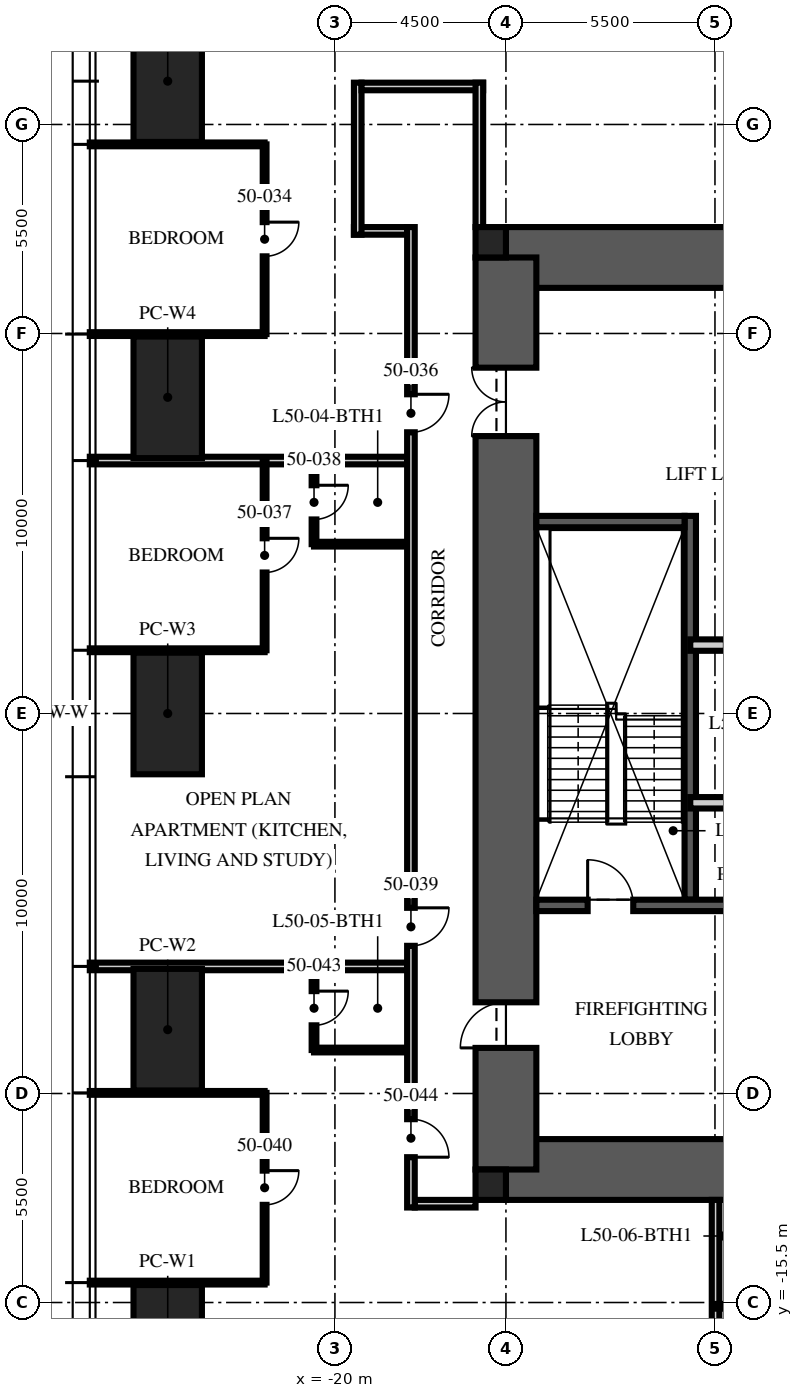
"""IFC4 building model, lengths in metres.
Left out: names, types, materials, properties, quantities, classifications, styles, units other than length and angle.
Written with IfcOpenShell. Run it as: python <this file> out.ifc"""

import sys

from ifc_helpers import new_model, si_unit, direction, frame, frame_2d, origin, origin_2d, place, context, subcontext, project, spatial, rectangle, hollow_rectangle, extrude, element, fill, save


model = new_model("IFC4")
c1 = context("Model", 3, precision=1e-05, world=origin(), true_north=direction((0.0, 1.0)))
c2 = subcontext(c1, "Body", "Model", "MODEL_VIEW")
j1 = project(units=[si_unit("LENGTHUNIT", "METRE"), si_unit("PLANEANGLEUNIT", "RADIAN")], contexts=[c1])
p1 = place(None, origin())
s1 = spatial("IfcSite", under=j1, at=p1, CompositionType="ELEMENT")
p2 = place(p1, origin())
s2 = spatial("IfcBuilding", under=s1, at=p2, CompositionType="ELEMENT")
p3 = place(p2, frame((0.0, 0.0, 203.25)))
s3 = spatial("IfcBuildingStorey", under=s2, at=p3, CompositionType="ELEMENT", Elevation=203.25)
for number, where, z_axis, x_axis in (
    (1, (-15.5, 12.0, -0.25), (0.0, 0.0, 1.0), (1.0, 0.0, 0.0)),
    (2, (-15.5, -12.0, -0.25), (0.0, 0.0, 1.0), (1.0, 0.0, 0.0)),
):
    element("IfcWall", number, at=place(p3, frame(where, z_axis=z_axis, x_axis=x_axis)), inside=s3, PredefinedType="SHEAR", context=c2, shape_type="SweptSolid", body=[
        extrude(rectangle(XDim=31.0, YDim=1.6, at=frame_2d((15.5, 0.0))), origin(), (0.0, 0.0, 1.0), 3.75),
    ])
p4 = place(p3, frame((-15.5, -12.0, -0.25), z_axis=(0.0, 0.0, 1.0), x_axis=(0.0, 1.0, 0.0)))
e3 = element("IfcWall", 3, at=p4, inside=s3, PredefinedType="SHEAR", context=c2, shape_type="SweptSolid", body=[
    extrude(rectangle(XDim=24.0, YDim=1.6, at=frame_2d((12.0, 0.0))), origin(), (0.0, 0.0, 1.0), 3.75),
])
p5 = place(p4, frame((3.2, 0.0, 0.25)))
e4 = element("IfcOpeningElement", 4, at=p5, cuts=e3, PredefinedType="OPENING", context=c2, shape_type="SweptSolid", body=[
    extrude(rectangle(XDim=1.2, YDim=2.1, at=frame_2d((0.6, 1.05))), frame((0.0, 0.81, 0.0), z_axis=(0.0, -1.0, 0.0), x_axis=(1.0, 0.0, 0.0)), (0.0, 0.0, 1.0), 1.62),
])
p6 = place(p4, frame((19.3, 0.0, 0.25)))
e5 = element("IfcOpeningElement", 5, at=p6, cuts=e3, PredefinedType="OPENING", context=c2, shape_type="SweptSolid", body=[
    extrude(rectangle(XDim=1.8, YDim=2.1, at=frame_2d((0.9, 1.05))), frame((0.0, 0.81, 0.0), z_axis=(0.0, -1.0, 0.0), x_axis=(1.0, 0.0, 0.0)), (0.0, 0.0, 1.0), 1.62),
])
for number, where, z_axis, x_axis in (
    (6, (-15.9, 12.4, -0.25), (0.0, 0.0, 1.0), (1.0, 0.0, 0.0)),
    (7, (-15.9, -12.4, -0.25), (0.0, 0.0, 1.0), (1.0, 0.0, 0.0)),
):
    element("IfcColumn", number, at=place(p3, frame(where, z_axis=z_axis, x_axis=x_axis)), inside=s3, PredefinedType="COLUMN", context=c2, shape_type="SweptSolid", body=[
        extrude(rectangle(XDim=0.8, YDim=0.8, at=origin_2d()), origin(), (0.0, 0.0, 1.0), 3.75),
    ])
for number, where, z_axis, x_axis in (
    (8, (-24.4, -16.64, 0.0), (0.0, 0.0, 1.0), (0.0, 1.0, 0.0)),
    (9, (-24.4, -8.32, 0.0), (0.0, 0.0, 1.0), (0.0, 1.0, 0.0)),
    (10, (-24.4, 0.0, 0.0), (0.0, 0.0, 1.0), (0.0, 1.0, 0.0)),
    (11, (-24.4, 8.32, 0.0), (0.0, 0.0, 1.0), (0.0, 1.0, 0.0)),
    (12, (-24.4, 16.64, 0.0), (0.0, 0.0, 1.0), (0.0, 1.0, 0.0)),
):
    element("IfcColumn", number, at=place(p3, frame(where, z_axis=z_axis, x_axis=x_axis)), inside=s3, PredefinedType="COLUMN", context=c2, shape_type="SweptSolid", body=[
        extrude(hollow_rectangle(XDim=3.2, YDim=1.8, WallThickness=0.2, at=origin_2d()), origin(), (0.0, 0.0, 1.0), 3.75),
    ])
p7 = place(p3, frame((-10.65, -4.9, 0.0), z_axis=(0.0, 0.0, 1.0), x_axis=(0.0, 1.0, 0.0)))
e13 = element("IfcWall", 13, at=p7, inside=s3, PredefinedType="SOLIDWALL", context=c2, shape_type="SweptSolid", body=[
    extrude(rectangle(XDim=10.1, YDim=0.3, at=frame_2d((5.05, 0.0))), origin(), (0.0, 0.0, 1.0), 3.5),
])
p8 = place(p3, frame((-14.7, -5.05, 0.0), z_axis=(0.0, 0.0, 1.0), x_axis=(1.0, 0.0, 0.0)))
e14 = element("IfcWall", 14, at=p8, inside=s3, PredefinedType="SOLIDWALL", context=c2, shape_type="SweptSolid", body=[
    extrude(rectangle(XDim=5.9, YDim=0.3, at=frame_2d((2.95, 0.0))), origin(), (0.0, 0.0, 1.0), 3.5),
])
p9 = place(p8, frame((1.35, 0.0, 0.0)))
e15 = element("IfcOpeningElement", 15, at=p9, cuts=e14, PredefinedType="OPENING", context=c2, shape_type="SweptSolid", body=[
    extrude(rectangle(XDim=1.2, YDim=2.1, at=frame_2d((0.6, 1.05))), frame((0.0, 0.16, 0.0), z_axis=(0.0, -1.0, 0.0), x_axis=(1.0, 0.0, 0.0)), (0.0, 0.0, 1.0), 0.32),
])
p10 = place(p3, frame((-14.7, 5.05, 0.0), z_axis=(0.0, 0.0, 1.0), x_axis=(1.0, 0.0, 0.0)))
e16 = element("IfcWall", 16, at=p10, inside=s3, PredefinedType="SOLIDWALL", context=c2, shape_type="SweptSolid", body=[
    extrude(rectangle(XDim=3.9, YDim=0.3, at=frame_2d((1.95, 0.0))), origin(), (0.0, 0.0, 1.0), 3.5),
])
p11 = place(p3, frame((-10.65, 1.8, 0.0), z_axis=(0.0, 0.0, 1.0), x_axis=(1.0, 0.0, 0.0)))
e17 = element("IfcWall", 17, at=p11, inside=s3, PredefinedType="PARTITIONING", context=c2, shape_type="SweptSolid", body=[
    extrude(rectangle(XDim=21.3, YDim=0.3, at=frame_2d((10.65, 0.0))), origin(), (0.0, 0.0, 1.0), 3.5),
])
p12 = place(p11, frame((10.05, 0.0, 0.0)))
e18 = element("IfcOpeningElement", 18, at=p12, cuts=e17, PredefinedType="OPENING", context=c2, shape_type="SweptSolid", body=[
    extrude(rectangle(XDim=1.2, YDim=2.1, at=frame_2d((0.6, 1.05))), frame((0.0, 0.16, 0.0), z_axis=(0.0, -1.0, 0.0), x_axis=(1.0, 0.0, 0.0)), (0.0, 0.0, 1.0), 0.32),
])
p13 = place(p11, frame((0.938, 0.0, 0.0)))
e19 = element("IfcOpeningElement", 19, at=p13, cuts=e17, PredefinedType="OPENING", context=c2, shape_type="SweptSolid", body=[
    extrude(rectangle(XDim=0.9, YDim=2.1, at=frame_2d((0.45, 1.05))), frame((0.0, 0.16, 0.0), z_axis=(0.0, -1.0, 0.0), x_axis=(1.0, 0.0, 0.0)), (0.0, 0.0, 1.0), 0.32),
])
p14 = place(p3, frame((-10.65, -2.35, 0.0), z_axis=(0.0, 0.0, 1.0), x_axis=(1.0, 0.0, 0.0)))
e20 = element("IfcWall", 20, at=p14, inside=s3, PredefinedType="PARTITIONING", context=c2, shape_type="SweptSolid", body=[
    extrude(rectangle(XDim=5.55, YDim=0.3, at=frame_2d((2.775, 0.0))), origin(), (0.0, 0.0, 1.0), 3.5),
])
p15 = place(p3, frame((-18.1, 12.7, 0.0), z_axis=(0.0, 0.0, 1.0), x_axis=(-1.0, 0.0, 0.0)))
e21 = element("IfcWall", 21, at=p15, inside=s3, PredefinedType="PARTITIONING", context=c2, shape_type="SweptSolid", body=[
    extrude(rectangle(XDim=1.4, YDim=0.2, at=frame_2d((0.7, 0.0))), origin(), (0.0, 0.0, 1.0), 2.81),
])
p16 = place(p3, frame((-19.4, 12.6, 0.0), z_axis=(0.0, 0.0, 1.0), x_axis=(0.0, 1.0, 0.0)))
e22 = element("IfcWall", 22, at=p16, inside=s3, PredefinedType="PARTITIONING", context=c2, shape_type="SweptSolid", body=[
    extrude(rectangle(XDim=4.0, YDim=0.2, at=frame_2d((2.0, 0.0))), origin(), (0.0, 0.0, 1.0), 2.6),
])
p17 = place(p3, frame((-19.3, 16.5, 0.0), z_axis=(0.0, 0.0, 1.0), x_axis=(1.0, 0.0, 0.0)))
e23 = element("IfcWall", 23, at=p17, inside=s3, PredefinedType="PARTITIONING", context=c2, shape_type="SweptSolid", body=[
    extrude(rectangle(XDim=3.2, YDim=0.2, at=frame_2d((1.6, 0.0))), origin(), (0.0, 0.0, 1.0), 2.3),
])
p18 = place(p3, frame((-16.2, 16.6, 0.0), z_axis=(0.0, 0.0, 1.0), x_axis=(0.0, -1.0, 0.0)))
e24 = element("IfcWall", 24, at=p18, inside=s3, PredefinedType="PARTITIONING", context=c2, shape_type="SweptSolid", body=[
    extrude(rectangle(XDim=3.8, YDim=0.2, at=frame_2d((1.9, 0.0))), origin(), (0.0, 0.0, 1.0), 2.3),
])
p19 = place(p3, frame((-16.3, -12.9, 0.0), z_axis=(0.0, 0.0, 1.0), x_axis=(-1.0, 0.0, 0.0)))
e25 = element("IfcWall", 25, at=p19, inside=s3, PredefinedType="PARTITIONING", context=c2, shape_type="SweptSolid", body=[
    extrude(rectangle(XDim=1.6, YDim=0.2, at=frame_2d((0.8, 0.0))), origin(), (0.0, 0.0, 1.0), 2.3),
])
for number, where, z_axis, x_axis in (
    (26, (-21.85, 14.976, 0.0), (0.0, 0.0, 1.0), (-1.0, 0.0, 0.0)),
    (27, (-21.85, 9.984, 0.0), (0.0, 0.0, 1.0), (-1.0, 0.0, 0.0)),
):
    element("IfcWall", number, at=place(p3, frame(where, z_axis=z_axis, x_axis=x_axis)), inside=s3, PredefinedType="PARTITIONING", context=c2, shape_type="SweptSolid", body=[
        extrude(rectangle(XDim=4.6, YDim=0.1, at=frame_2d((2.3, 0.0))), origin(), (0.0, 0.0, 1.0), 2.91),
    ])
p20 = place(p3, frame((-18.1, 6.656, 0.0), z_axis=(0.0, 0.0, 1.0), x_axis=(-1.0, 0.0, 0.0)))
e28 = element("IfcWall", 28, at=p20, inside=s3, PredefinedType="PARTITIONING", context=c2, shape_type="SweptSolid", body=[
    extrude(rectangle(XDim=8.35, YDim=0.2, at=frame_2d((4.175, 0.0))), origin(), (0.0, 0.0, 1.0), 2.91),
])
p21 = place(p3, frame((-21.85, 1.664, 0.0), z_axis=(0.0, 0.0, 1.0), x_axis=(-1.0, 0.0, 0.0)))
e29 = element("IfcWall", 29, at=p21, inside=s3, PredefinedType="PARTITIONING", context=c2, shape_type="SweptSolid", body=[
    extrude(rectangle(XDim=4.6, YDim=0.1, at=frame_2d((2.3, 0.0))), origin(), (0.0, 0.0, 1.0), 2.91),
])
p22 = place(p3, frame((-18.1, -6.656, 0.0), z_axis=(0.0, 0.0, 1.0), x_axis=(-1.0, 0.0, 0.0)))
e30 = element("IfcWall", 30, at=p22, inside=s3, PredefinedType="PARTITIONING", context=c2, shape_type="SweptSolid", body=[
    extrude(rectangle(XDim=8.35, YDim=0.2, at=frame_2d((4.175, 0.0))), origin(), (0.0, 0.0, 1.0), 2.91),
])
for number, where, z_axis, x_axis in (
    (31, (-21.85, -9.984, 0.0), (0.0, 0.0, 1.0), (-1.0, 0.0, 0.0)),
    (32, (-21.85, -14.976, 0.0), (0.0, 0.0, 1.0), (-1.0, 0.0, 0.0)),
):
    element("IfcWall", number, at=place(p3, frame(where, z_axis=z_axis, x_axis=x_axis)), inside=s3, PredefinedType="PARTITIONING", context=c2, shape_type="SweptSolid", body=[
        extrude(rectangle(XDim=4.6, YDim=0.1, at=frame_2d((2.3, 0.0))), origin(), (0.0, 0.0, 1.0), 2.91),
    ])
p23 = place(p3, frame((-9.984, -12.8, 0.0), z_axis=(0.0, 0.0, 1.0), x_axis=(0.0, -1.0, 0.0)))
e33 = element("IfcWall", 33, at=p23, inside=s3, PredefinedType="PARTITIONING", context=c2, shape_type="SweptSolid", body=[
    extrude(rectangle(XDim=13.65, YDim=0.2, at=frame_2d((6.825, 0.0))), origin(), (0.0, 0.0, 1.0), 2.91),
])
p24 = place(p3, frame((-21.85, 14.976, 0.0), z_axis=(0.0, 0.0, 1.0), x_axis=(0.0, -1.0, 0.0)))
e34 = element("IfcWall", 34, at=p24, inside=s3, PredefinedType="PARTITIONING", context=c2, shape_type="SweptSolid", body=[
    extrude(rectangle(XDim=4.992, YDim=0.1, at=frame_2d((2.496, 0.0))), origin(), (0.0, 0.0, 1.0), 2.81),
])
p25 = place(p24, frame((2.046, 0.0, 0.0)))
e35 = element("IfcOpeningElement", 35, at=p25, cuts=e34, PredefinedType="OPENING", context=c2, shape_type="SweptSolid", body=[
    extrude(rectangle(XDim=0.9, YDim=2.1, at=frame_2d((0.45, 1.05))), frame((0.0, 0.06, 0.0), z_axis=(0.0, -1.0, 0.0), x_axis=(1.0, 0.0, 0.0)), (0.0, 0.0, 1.0), 0.12),
])
p26 = place(p3, frame((-21.85, 6.656, 0.0), z_axis=(0.0, 0.0, 1.0), x_axis=(0.0, -1.0, 0.0)))
e36 = element("IfcWall", 36, at=p26, inside=s3, PredefinedType="PARTITIONING", context=c2, shape_type="SweptSolid", body=[
    extrude(rectangle(XDim=4.992, YDim=0.1, at=frame_2d((2.496, 0.0))), origin(), (0.0, 0.0, 1.0), 2.81),
])
p27 = place(p26, frame((2.046, 0.0, 0.0)))
e37 = element("IfcOpeningElement", 37, at=p27, cuts=e36, PredefinedType="OPENING", context=c2, shape_type="SweptSolid", body=[
    extrude(rectangle(XDim=0.9, YDim=2.1, at=frame_2d((0.45, 1.05))), frame((0.0, 0.06, 0.0), z_axis=(0.0, -1.0, 0.0), x_axis=(1.0, 0.0, 0.0)), (0.0, 0.0, 1.0), 0.12),
])
p28 = place(p3, frame((-20.55, 6.656, 0.0), z_axis=(0.0, 0.0, 1.0), x_axis=(0.0, -1.0, 0.0)))
e38 = element("IfcWall", 38, at=p28, inside=s3, PredefinedType="PARTITIONING", context=c2, shape_type="SweptSolid", body=[
    extrude(rectangle(XDim=2.2, YDim=0.125, at=frame_2d((1.1, 0.0))), origin(), (0.0, 0.0, 1.0), 3.5),
])
p29 = place(p28, frame((0.65, 0.0, 0.0)))
e39 = element("IfcOpeningElement", 39, at=p29, cuts=e38, PredefinedType="OPENING", context=c2, shape_type="SweptSolid", body=[
    extrude(rectangle(XDim=0.9, YDim=2.1, at=frame_2d((0.45, 1.05))), frame((0.0, 0.073, 0.0), z_axis=(0.0, -1.0, 0.0), x_axis=(1.0, 0.0, 0.0)), (0.0, 0.0, 1.0), 0.145),
])
p30 = place(p3, frame((-18.1, 4.456, 0.0), z_axis=(0.0, 0.0, 1.0), x_axis=(-1.0, 0.0, 0.0)))
e40 = element("IfcWall", 40, at=p30, inside=s3, PredefinedType="PARTITIONING", context=c2, shape_type="SweptSolid", body=[
    extrude(rectangle(XDim=2.45, YDim=0.125, at=frame_2d((1.225, 0.0))), origin(), (0.0, 0.0, 1.0), 3.5),
])
p31 = place(p3, frame((-21.85, -9.984, 0.0), z_axis=(0.0, 0.0, 1.0), x_axis=(0.0, -1.0, 0.0)))
e41 = element("IfcWall", 41, at=p31, inside=s3, PredefinedType="PARTITIONING", context=c2, shape_type="SweptSolid", body=[
    extrude(rectangle(XDim=4.992, YDim=0.1, at=frame_2d((2.496, 0.0))), origin(), (0.0, 0.0, 1.0), 2.81),
])
p32 = place(p31, frame((2.046, 0.0, 0.0)))
e42 = element("IfcOpeningElement", 42, at=p32, cuts=e41, PredefinedType="OPENING", context=c2, shape_type="SweptSolid", body=[
    extrude(rectangle(XDim=0.9, YDim=2.1, at=frame_2d((0.45, 1.05))), frame((0.0, 0.06, 0.0), z_axis=(0.0, -1.0, 0.0), x_axis=(1.0, 0.0, 0.0)), (0.0, 0.0, 1.0), 0.12),
])
p33 = place(p3, frame((-20.55, -6.656, 0.0), z_axis=(0.0, 0.0, 1.0), x_axis=(0.0, -1.0, 0.0)))
e43 = element("IfcWall", 43, at=p33, inside=s3, PredefinedType="PARTITIONING", context=c2, shape_type="SweptSolid", body=[
    extrude(rectangle(XDim=2.2, YDim=0.125, at=frame_2d((1.1, 0.0))), origin(), (0.0, 0.0, 1.0), 2.6),
])
p34 = place(p33, frame((0.65, 0.0, 0.0)))
e44 = element("IfcOpeningElement", 44, at=p34, cuts=e43, PredefinedType="OPENING", context=c2, shape_type="SweptSolid", body=[
    extrude(rectangle(XDim=0.9, YDim=2.1, at=frame_2d((0.45, 1.05))), frame((0.0, 0.073, 0.0), z_axis=(0.0, -1.0, 0.0), x_axis=(1.0, 0.0, 0.0)), (0.0, 0.0, 1.0), 0.145),
])
p35 = place(p3, frame((-18.1, -8.856, 0.0), z_axis=(0.0, 0.0, 1.0), x_axis=(-1.0, 0.0, 0.0)))
e45 = element("IfcWall", 45, at=p35, inside=s3, PredefinedType="PARTITIONING", context=c2, shape_type="SweptSolid", body=[
    extrude(rectangle(XDim=2.45, YDim=0.125, at=frame_2d((1.225, 0.0))), origin(), (0.0, 0.0, 1.0), 3.5),
])
p36 = place(p3, frame((-9.984, -15.6, 0.0), z_axis=(0.0, 0.0, 1.0), x_axis=(1.0, 0.0, 0.0)))
e46 = element("IfcWall", 46, at=p36, inside=s3, PredefinedType="PARTITIONING", context=c2, shape_type="SweptSolid", body=[
    extrude(rectangle(XDim=4.0, YDim=0.125, at=frame_2d((2.0, 0.0))), origin(), (0.0, 0.0, 1.0), 2.6),
])
p37 = place(p36, frame((0.65, 0.0, 0.0)))
e47 = element("IfcOpeningElement", 47, at=p37, cuts=e46, PredefinedType="OPENING", context=c2, shape_type="SweptSolid", body=[
    extrude(rectangle(XDim=0.9, YDim=2.1, at=frame_2d((0.45, 1.05))), frame((0.0, 0.073, 0.0), z_axis=(0.0, -1.0, 0.0), x_axis=(1.0, 0.0, 0.0)), (0.0, 0.0, 1.0), 0.145),
])
p38 = place(p36, frame((2.65, 0.0, 0.0)))
e48 = element("IfcOpeningElement", 48, at=p38, cuts=e46, PredefinedType="OPENING", context=c2, shape_type="SweptSolid", body=[
    extrude(rectangle(XDim=0.9, YDim=2.1, at=frame_2d((0.45, 1.05))), frame((0.0, 0.073, 0.0), z_axis=(0.0, -1.0, 0.0), x_axis=(1.0, 0.0, 0.0)), (0.0, 0.0, 1.0), 0.145),
])
p39 = place(p3, frame((-18.0, 12.8, 0.0), z_axis=(0.0, 0.0, 1.0), x_axis=(0.0, -1.0, 0.0)))
e49 = element("IfcWall", 49, at=p39, inside=s3, PredefinedType="PARTITIONING", context=c2, shape_type="SweptSolid", body=[
    extrude(rectangle(XDim=25.8, YDim=0.2, at=frame_2d((12.9, 0.0))), origin(), (0.0, 0.0, 1.0), 2.6),
])
p40 = place(p39, frame((4.4, 0.0, 0.0)))
e50 = element("IfcOpeningElement", 50, at=p40, cuts=e49, PredefinedType="OPENING", context=c2, shape_type="SweptSolid", body=[
    extrude(rectangle(XDim=1.0, YDim=2.2, at=frame_2d((0.5, 1.1))), frame((0.0, 0.11, 0.0), z_axis=(0.0, -1.0, 0.0), x_axis=(1.0, 0.0, 0.0)), (0.0, 0.0, 1.0), 0.22),
])
p41 = place(p39, frame((17.914, 0.0, 0.0)))
e51 = element("IfcOpeningElement", 51, at=p41, cuts=e49, PredefinedType="OPENING", context=c2, shape_type="SweptSolid", body=[
    extrude(rectangle(XDim=1.0, YDim=2.2, at=frame_2d((0.5, 1.1))), frame((0.0, 0.11, 0.0), z_axis=(0.0, -1.0, 0.0), x_axis=(1.0, 0.0, 0.0)), (0.0, 0.0, 1.0), 0.22),
])
p42 = place(p39, frame((23.476, 0.0, 0.0)))
e52 = element("IfcOpeningElement", 52, at=p42, cuts=e49, PredefinedType="OPENING", context=c2, shape_type="SweptSolid", body=[
    extrude(rectangle(XDim=1.0, YDim=2.2, at=frame_2d((0.5, 1.1))), frame((0.0, 0.11, 0.0), z_axis=(0.0, -1.0, 0.0), x_axis=(1.0, 0.0, 0.0)), (0.0, 0.0, 1.0), 0.22),
])
p43 = place(p9, origin())
e53 = element("IfcDoor", 53, at=p43, inside=s3, OperationType="SINGLE_SWING_LEFT", PredefinedType="DOOR", context=c2, shape_type="SweptSolid", body=[
    extrude(rectangle(XDim=1.2, YDim=2.1, at=frame_2d((0.6, 1.05))), frame((0.0, 0.025, 0.0), z_axis=(0.0, -1.0, 0.0), x_axis=(1.0, 0.0, 0.0)), (0.0, 0.0, 1.0), 0.05),
])
fill(e15, e53)
p44 = place(p5, origin())
e54 = element("IfcDoor", 54, at=p44, inside=s3, OperationType="SINGLE_SWING_LEFT", PredefinedType="DOOR", context=c2, shape_type="SweptSolid", body=[
    extrude(rectangle(XDim=1.2, YDim=2.1, at=frame_2d((0.6, 1.05))), frame((0.0, 0.025, 0.0), z_axis=(0.0, -1.0, 0.0), x_axis=(1.0, 0.0, 0.0)), (0.0, 0.0, 1.0), 0.05),
])
fill(e4, e54)
p45 = place(p6, origin())
e55 = element("IfcDoor", 55, at=p45, inside=s3, OperationType="DOUBLE_DOOR_SINGLE_SWING", PredefinedType="DOOR", context=c2, shape_type="SweptSolid", body=[
    extrude(rectangle(XDim=1.8, YDim=2.1, at=frame_2d((0.9, 1.05))), frame((0.0, 0.025, 0.0), z_axis=(0.0, -1.0, 0.0), x_axis=(1.0, 0.0, 0.0)), (0.0, 0.0, 1.0), 0.05),
])
fill(e5, e55)
p46 = place(p25, origin())
e56 = element("IfcDoor", 56, at=p46, inside=s3, OperationType="SINGLE_SWING_LEFT", PredefinedType="DOOR", context=c2, shape_type="SweptSolid", body=[
    extrude(rectangle(XDim=0.9, YDim=2.1, at=frame_2d((0.45, 1.05))), frame((0.0, 0.025, 0.0), z_axis=(0.0, -1.0, 0.0), x_axis=(1.0, 0.0, 0.0)), (0.0, 0.0, 1.0), 0.05),
])
fill(e35, e56)
p47 = place(p40, origin())
e57 = element("IfcDoor", 57, at=p47, inside=s3, OperationType="SINGLE_SWING_LEFT", PredefinedType="DOOR", context=c2, shape_type="SweptSolid", body=[
    extrude(rectangle(XDim=1.0, YDim=2.2, at=frame_2d((0.5, 1.1))), frame((0.0, 0.025, 0.0), z_axis=(0.0, -1.0, 0.0), x_axis=(1.0, 0.0, 0.0)), (0.0, 0.0, 1.0), 0.05),
])
fill(e50, e57)
p48 = place(p27, origin())
e58 = element("IfcDoor", 58, at=p48, inside=s3, OperationType="SINGLE_SWING_LEFT", PredefinedType="DOOR", context=c2, shape_type="SweptSolid", body=[
    extrude(rectangle(XDim=0.9, YDim=2.1, at=frame_2d((0.45, 1.05))), frame((0.0, 0.025, 0.0), z_axis=(0.0, -1.0, 0.0), x_axis=(1.0, 0.0, 0.0)), (0.0, 0.0, 1.0), 0.05),
])
fill(e37, e58)
p49 = place(p29, origin())
e59 = element("IfcDoor", 59, at=p49, inside=s3, OperationType="SINGLE_SWING_LEFT", PredefinedType="DOOR", context=c2, shape_type="SweptSolid", body=[
    extrude(rectangle(XDim=0.9, YDim=2.1, at=frame_2d((0.45, 1.05))), frame((0.0, 0.025, 0.0), z_axis=(0.0, -1.0, 0.0), x_axis=(1.0, 0.0, 0.0)), (0.0, 0.0, 1.0), 0.05),
])
fill(e39, e59)
p50 = place(p41, origin())
e60 = element("IfcDoor", 60, at=p50, inside=s3, OperationType="SINGLE_SWING_LEFT", PredefinedType="DOOR", context=c2, shape_type="SweptSolid", body=[
    extrude(rectangle(XDim=1.0, YDim=2.2, at=frame_2d((0.5, 1.1))), frame((0.0, 0.025, 0.0), z_axis=(0.0, -1.0, 0.0), x_axis=(1.0, 0.0, 0.0)), (0.0, 0.0, 1.0), 0.05),
])
fill(e51, e60)
p51 = place(p32, origin())
e61 = element("IfcDoor", 61, at=p51, inside=s3, OperationType="SINGLE_SWING_LEFT", PredefinedType="DOOR", context=c2, shape_type="SweptSolid", body=[
    extrude(rectangle(XDim=0.9, YDim=2.1, at=frame_2d((0.45, 1.05))), frame((0.0, 0.025, 0.0), z_axis=(0.0, -1.0, 0.0), x_axis=(1.0, 0.0, 0.0)), (0.0, 0.0, 1.0), 0.05),
])
fill(e42, e61)
p52 = place(p34, origin())
e62 = element("IfcDoor", 62, at=p52, inside=s3, OperationType="SINGLE_SWING_LEFT", PredefinedType="DOOR", context=c2, shape_type="SweptSolid", body=[
    extrude(rectangle(XDim=0.9, YDim=2.1, at=frame_2d((0.45, 1.05))), frame((0.0, 0.025, 0.0), z_axis=(0.0, -1.0, 0.0), x_axis=(1.0, 0.0, 0.0)), (0.0, 0.0, 1.0), 0.05),
])
fill(e44, e62)
p53 = place(p42, origin())
e63 = element("IfcDoor", 63, at=p53, inside=s3, OperationType="SINGLE_SWING_RIGHT", PredefinedType="DOOR", context=c2, shape_type="SweptSolid", body=[
    extrude(rectangle(XDim=1.0, YDim=2.2, at=frame_2d((0.5, 1.1))), frame((0.0, 0.025, 0.0), z_axis=(0.0, -1.0, 0.0), x_axis=(1.0, 0.0, 0.0)), (0.0, 0.0, 1.0), 0.05),
])
fill(e52, e63)
save(model, sys.argv[1])
